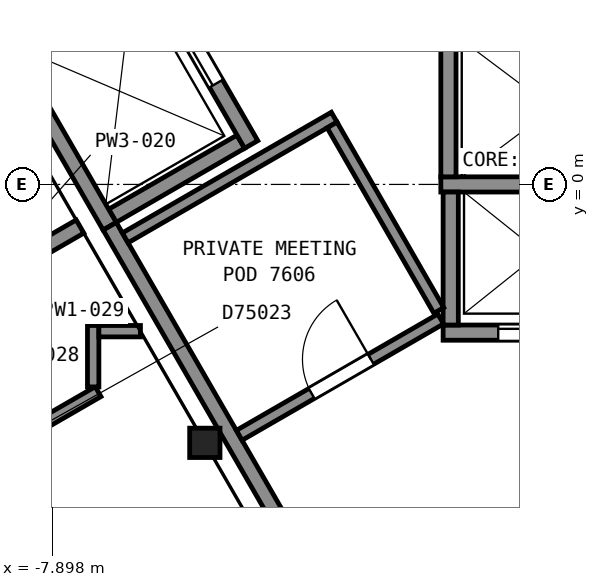
"""IFC4 building model, lengths in metres.
Left out: names, types, materials, properties, quantities, classifications, styles, units other than length and angle.
Written with IfcOpenShell. Run it as: python <this file> out.ifc"""

import sys

from ifc_helpers import new_model, si_unit, direction, frame, frame_2d, origin, origin_2d, place, context, subcontext, project, spatial, rectangle, i_section, extrude, element, fill, save


model = new_model("IFC4")
c1 = context("Model", 3, precision=1e-05, world=origin(), true_north=direction((0.0, 1.0)))
c2 = subcontext(c1, "Body", "Model", "MODEL_VIEW")
j1 = project(units=[si_unit("LENGTHUNIT", "METRE"), si_unit("PLANEANGLEUNIT", "RADIAN")], contexts=[c1])
p1 = place(None, origin())
s1 = spatial("IfcSite", under=j1, at=p1, CompositionType="ELEMENT")
p2 = place(p1, origin())
s2 = spatial("IfcBuilding", under=s1, at=p2, CompositionType="ELEMENT")
p3 = place(p2, frame((0.0, 0.0, 301.0)))
s3 = spatial("IfcBuildingStorey", under=s2, at=p3, CompositionType="ELEMENT", Elevation=301.0)
p4 = place(p3, frame((-5.89, -3.4, 0.0), z_axis=(0.0, 0.0, 1.0), x_axis=(1.0, 0.0, 0.0)))
e1 = element("IfcColumn", 1, at=p4, inside=s3, PredefinedType="COLUMN", context=c2, shape_type="SweptSolid", body=[
    extrude(i_section(OverallWidth=0.399, OverallDepth=0.386, WebThickness=0.021, FlangeThickness=0.033, FilletRadius=0.015, at=origin_2d()), origin(), (0.0, 0.0, 1.0), 3.7),
])
p5 = place(p3, frame((-2.755, -1.95, 0.0), z_axis=(0.0, 0.0, 1.0), x_axis=(1.0, 0.0, 0.0)))
e2 = element("IfcWall", 2, at=p5, inside=s3, PredefinedType="PARTITIONING", context=c2, shape_type="SweptSolid", body=[
    extrude(rectangle(XDim=2.55, YDim=0.2, at=frame_2d((1.275, 0.0))), origin(), (0.0, 0.0, 1.0), 3.7),
])
p6 = place(p5, frame((0.725, 0.0, 0.0)))
e3 = element("IfcOpeningElement", 3, at=p6, cuts=e2, PredefinedType="OPENING", context=c2, shape_type="SweptSolid", body=[
    extrude(rectangle(XDim=1.1, YDim=2.1, at=frame_2d((0.55, 1.05))), frame((0.0, 0.11, 0.0), z_axis=(0.0, -1.0, 0.0), x_axis=(1.0, 0.0, 0.0)), (0.0, 0.0, 1.0), 0.22),
])
p7 = place(p3, frame((-2.785, 0.0, 0.0), z_axis=(0.0, 0.0, 1.0), x_axis=(1.0, 0.0, 0.0)))
e4 = element("IfcWall", 4, at=p7, inside=s3, PredefinedType="PARTITIONING", context=c2, shape_type="SweptSolid", body=[
    extrude(rectangle(XDim=2.95, YDim=0.2, at=frame_2d((1.475, 0.0))), origin(), (0.0, 0.0, 1.0), 3.7),
])
p8 = place(p3, frame((-7.105, -0.413, 0.0), z_axis=(0.0, 0.0, 1.0), x_axis=(0.866000020948, 0.500043961785, 0.0)))
e5 = element("IfcWall", 5, at=p8, inside=s3, PredefinedType="PARTITIONING", context=c2, shape_type="SweptSolid", body=[
    extrude(rectangle(XDim=1.95, YDim=0.2, at=frame_2d((0.975, 0.0))), origin(), (0.0, 0.0, 1.0), 3.7),
])
p9 = place(p3, frame((-2.655, -1.85, 0.0), z_axis=(0.0, 0.0, 1.0), x_axis=(0.0, 1.0, 0.0)))
e6 = element("IfcWall", 6, at=p9, inside=s3, PredefinedType="PARTITIONING", context=c2, shape_type="SweptSolid", body=[
    extrude(rectangle(XDim=1.75, YDim=0.2, at=frame_2d((0.875, 0.0))), origin(), (0.0, 0.0, 1.0), 3.7),
])
p10 = place(p3, frame((-2.685, 0.1, 0.0), z_axis=(0.0, 0.0, 1.0), x_axis=(0.0, 1.0, 0.0)))
e7 = element("IfcWall", 7, at=p10, inside=s3, PredefinedType="PARTITIONING", context=c2, shape_type="SweptSolid", body=[
    extrude(rectangle(XDim=1.95, YDim=0.2, at=frame_2d((0.975, 0.0))), origin(), (0.0, 0.0, 1.0), 3.7),
])
p11 = place(p3, frame((-5.28, 0.525, 0.0), z_axis=(0.0, 0.0, 1.0), x_axis=(-0.500037662692, 0.866003658127, 0.0)))
e8 = element("IfcWall", 8, at=p11, inside=s3, PredefinedType="PARTITIONING", context=c2, shape_type="SweptSolid", body=[
    extrude(rectangle(XDim=2.95, YDim=0.2, at=frame_2d((1.475, 0.0))), origin(), (0.0, 0.0, 1.0), 3.7),
])
p12 = place(p11, frame((0.925, 0.0, 0.0)))
e9 = element("IfcOpeningElement", 9, at=p12, cuts=e8, PredefinedType="OPENING", context=c2, shape_type="SweptSolid", body=[
    extrude(rectangle(XDim=1.1, YDim=2.1, at=frame_2d((0.55, 1.05))), frame((0.0, 0.11, 0.0), z_axis=(0.0, -1.0, 0.0), x_axis=(1.0, 0.0, 0.0)), (0.0, 0.0, 1.0), 0.22),
])
p13 = place(p3, frame((-7.142, -0.55, 0.0), z_axis=(0.0, 0.0, 1.0), x_axis=(-0.49997559174, 0.866039495442, 0.0)))
e10 = element("IfcWall", 10, at=p13, inside=s3, PredefinedType="PARTITIONING", context=c2, shape_type="SweptSolid", body=[
    extrude(rectangle(XDim=2.95, YDim=0.2, at=frame_2d((1.475, 0.0))), origin(), (0.0, 0.0, 1.0), 3.7),
])
p14 = place(p3, frame((-7.141, -0.551, 0.0), z_axis=(0.0, 0.0, 1.0), x_axis=(0.500001302854, -0.86602465158, 0.0)))
e11 = element("IfcWall", 11, at=p14, inside=s3, PredefinedType="PARTITIONING", context=c2, shape_type="SweptSolid", body=[
    extrude(rectangle(XDim=6.846, YDim=0.2, at=frame_2d((3.423, 0.0))), origin(), (0.0, 0.0, 1.0), 3.45),
])
p15 = place(p14, frame((4.983, 0.0, 0.0)))
e12 = element("IfcOpeningElement", 12, at=p15, cuts=e11, PredefinedType="OPENING", context=c2, shape_type="SweptSolid", body=[
    extrude(rectangle(XDim=1.2, YDim=2.1, at=frame_2d((0.6, 1.05))), frame((0.0, 0.11, 0.0), z_axis=(0.0, -1.0, 0.0), x_axis=(1.0, 0.0, 0.0)), (0.0, 0.0, 1.0), 0.22),
])
p16 = place(p3, frame((-6.938, -0.703, 0.0), z_axis=(0.0, 0.0, 1.0), x_axis=(0.866029357279, 0.499993152284, 0.0)))
e13 = element("IfcWall", 13, at=p16, inside=s3, PredefinedType="PARTITIONING", context=c2, shape_type="SweptSolid", body=[
    extrude(rectangle(XDim=3.175, YDim=0.15, at=frame_2d((1.587, 0.0))), origin(), (0.0, 0.0, 1.0), 3.45),
])
p17 = place(p3, frame((-5.438, -3.301, 0.0), z_axis=(0.0, 0.0, 1.0), x_axis=(0.865961047596, 0.500111451624, 0.0)))
e14 = element("IfcWall", 14, at=p17, inside=s3, PredefinedType="PARTITIONING", context=c2, shape_type="SweptSolid", body=[
    extrude(rectangle(XDim=3.06, YDim=0.15, at=frame_2d((1.53, 0.0))), origin(), (0.0, 0.0, 1.0), 3.45),
])
p18 = place(p17, frame((1.1, 0.0, 0.0)))
e15 = element("IfcOpeningElement", 15, at=p18, cuts=e14, PredefinedType="OPENING", context=c2, shape_type="SweptSolid", body=[
    extrude(rectangle(XDim=0.9, YDim=2.1, at=frame_2d((0.45, 1.05))), frame((0.0, 0.085, 0.0), z_axis=(0.0, -1.0, 0.0), x_axis=(1.0, 0.0, 0.0)), (0.0, 0.0, 1.0), 0.17),
])
p19 = place(p3, frame((-4.216, 0.782, 0.0), z_axis=(0.0, 0.0, 1.0), x_axis=(0.498733469436, -0.866755401751, 0.0)))
e16 = element("IfcWall", 16, at=p19, inside=s3, PredefinedType="PARTITIONING", context=c2, shape_type="SweptSolid", body=[
    extrude(rectangle(XDim=2.815, YDim=0.15, at=frame_2d((1.407, 0.0))), origin(), (0.0, 0.0, 1.0), 3.45),
])
p20 = place(p3, frame((-12.205, -5.562, 0.0), z_axis=(0.0, 0.0, 1.0), x_axis=(0.866006351856, 0.500032997455, 0.0)))
e17 = element("IfcWall", 17, at=p20, inside=s3, PredefinedType="PARTITIONING", context=c2, shape_type="SweptSolid", body=[
    extrude(rectangle(XDim=5.671, YDim=0.15, at=frame_2d((2.835, 0.0))), origin(), (0.0, 0.0, 1.0), 2.723),
])
p21 = place(p20, frame((2.935, 0.0, 0.0)))
e18 = element("IfcOpeningElement", 18, at=p21, cuts=e17, PredefinedType="OPENING", context=c2, shape_type="SweptSolid", body=[
    extrude(rectangle(XDim=1.0, YDim=2.1, at=frame_2d((0.5, 1.05))), frame((0.0, 0.085, 0.0), z_axis=(0.0, -1.0, 0.0), x_axis=(1.0, 0.0, 0.0)), (0.0, 0.0, 1.0), 0.17),
])
p22 = place(p3, frame((-10.346, -2.179, 0.0), z_axis=(0.0, 0.0, 1.0), x_axis=(0.86595908408, 0.500114851509, 0.0)))
e19 = element("IfcWall", 19, at=p22, inside=s3, PredefinedType="PARTITIONING", context=c2, shape_type="SweptSolid", body=[
    extrude(rectangle(XDim=3.249, YDim=0.2, at=frame_2d((1.625, 0.0))), origin(), (0.0, 0.0, 1.0), 2.723),
])
p23 = place(p3, frame((-7.359, -2.664, 0.0), z_axis=(0.0, 0.0, 1.0), x_axis=(0.0, 1.0, 0.0)))
e20 = element("IfcWall", 20, at=p23, inside=s3, PredefinedType="PARTITIONING", context=c2, shape_type="SweptSolid", body=[
    extrude(rectangle(XDim=0.808, YDim=0.15, at=frame_2d((0.404, 0.0))), origin(), (0.0, 0.0, 1.0), 2.723),
])
p24 = place(p3, frame((-7.284, -1.931, 0.0), z_axis=(0.0, 0.0, 1.0), x_axis=(1.0, 0.0, 0.0)))
e21 = element("IfcWall", 21, at=p24, inside=s3, PredefinedType="PARTITIONING", context=c2, shape_type="SweptSolid", body=[
    extrude(rectangle(XDim=0.547, YDim=0.15, at=frame_2d((0.273, 0.0))), origin(), (0.0, 0.0, 1.0), 2.723),
])
p25 = place(p6, origin())
e22 = element("IfcDoor", 22, at=p25, inside=s3, OperationType="SLIDING_TO_RIGHT", PredefinedType="DOOR", context=c2, shape_type="SweptSolid", body=[
    extrude(rectangle(XDim=1.1, YDim=2.1, at=frame_2d((0.55, 1.05))), frame((0.0, 0.025, 0.0), z_axis=(0.0, -1.0, 0.0), x_axis=(1.0, 0.0, 0.0)), (0.0, 0.0, 1.0), 0.05),
])
fill(e3, e22)
p26 = place(p12, origin())
e23 = element("IfcDoor", 23, at=p26, inside=s3, OperationType="SLIDING_TO_LEFT", PredefinedType="DOOR", context=c2, shape_type="SweptSolid", body=[
    extrude(rectangle(XDim=1.1, YDim=2.1, at=frame_2d((0.55, 1.05))), frame((0.0, 0.025, 0.0), z_axis=(0.0, -1.0, 0.0), x_axis=(1.0, 0.0, 0.0)), (0.0, 0.0, 1.0), 0.05),
])
fill(e9, e23)
p27 = place(p18, origin())
e24 = element("IfcDoor", 24, at=p27, inside=s3, OperationType="SINGLE_SWING_RIGHT", PredefinedType="DOOR", context=c2, shape_type="SweptSolid", body=[
    extrude(rectangle(XDim=0.9, YDim=2.1, at=frame_2d((0.45, 1.05))), frame((0.0, 0.025, 0.0), z_axis=(0.0, -1.0, 0.0), x_axis=(1.0, 0.0, 0.0)), (0.0, 0.0, 1.0), 0.05),
])
fill(e15, e24)
save(model, sys.argv[1])
